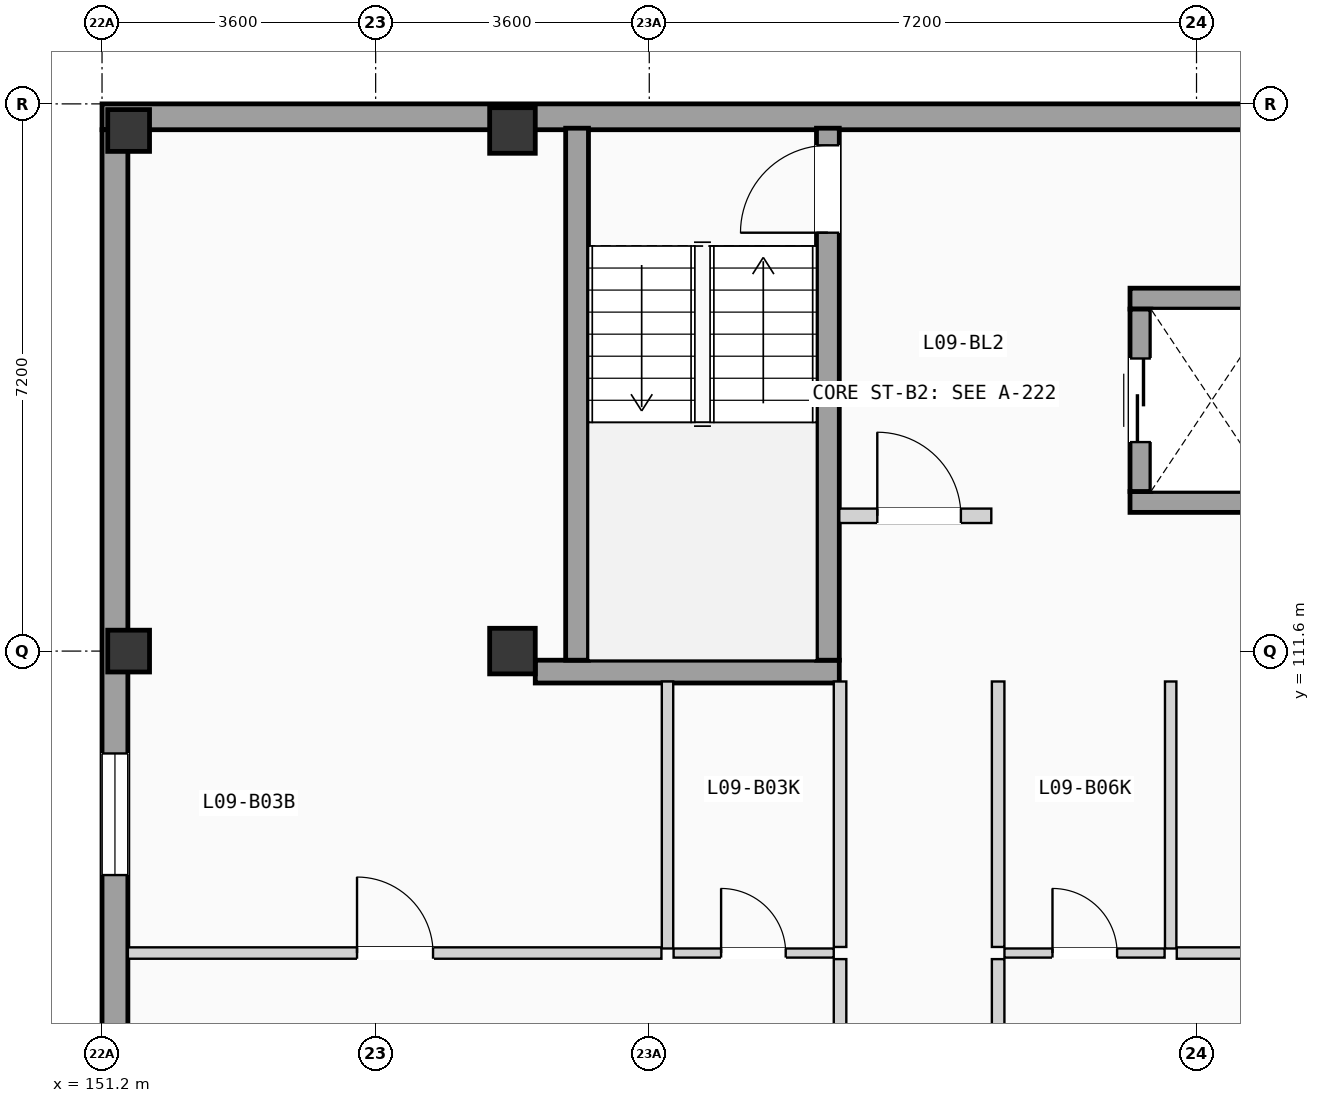
"""IFC4 building model, lengths in metres.
Left out: names, types, materials, properties, quantities, classifications, styles, units other than length and angle.
Written with IfcOpenShell. Run it as: python <this file> out.ifc"""

import sys

from ifc_helpers import new_model, si_unit, direction, frame, frame_2d, origin, origin_2d, place, context, subcontext, project, spatial, rectangle, extrude, element, fill, save


model = new_model("IFC4")
c1 = context("Model", 3, precision=1e-05, world=origin(), true_north=direction((0.0, 1.0)))
c2 = subcontext(c1, "Body", "Model", "MODEL_VIEW")
j1 = project(units=[si_unit("LENGTHUNIT", "METRE"), si_unit("PLANEANGLEUNIT", "RADIAN")], contexts=[c1])
p1 = place(None, origin())
s1 = spatial("IfcSite", under=j1, at=p1, CompositionType="ELEMENT")
p2 = place(p1, origin())
s2 = spatial("IfcBuilding", under=s1, at=p2, CompositionType="ELEMENT")
p3 = place(p2, frame((0.0, 0.0, 30.975)))
s3 = spatial("IfcBuildingStorey", under=s2, at=p3, CompositionType="ELEMENT", Elevation=30.975)
for number, where, z_axis, x_axis in (
    (1, (151.55, 111.6, 0.0), (0.0, 0.0, 1.0), (1.0, 0.0, 0.0)),
    (2, (151.55, 118.45, 0.0), (0.0, 0.0, 1.0), (1.0, 0.0, 0.0)),
):
    element("IfcColumn", number, at=place(p3, frame(where, z_axis=z_axis, x_axis=x_axis)), inside=s3, PredefinedType="COLUMN", context=c2, shape_type="SweptSolid", body=[
        extrude(rectangle(XDim=0.55, YDim=0.55, at=origin_2d()), origin(), (0.0, 0.0, 1.0), 3.15),
    ])
for number, where, z_axis, x_axis in (
    (3, (156.6, 111.6, 0.0), (0.0, 0.0, 1.0), (1.0, 0.0, 0.0)),
    (4, (156.6, 118.45, 0.0), (0.0, 0.0, 1.0), (1.0, 0.0, 0.0)),
):
    element("IfcColumn", number, at=place(p3, frame(where, z_axis=z_axis, x_axis=x_axis)), inside=s3, PredefinedType="COLUMN", context=c2, shape_type="SweptSolid", body=[
        extrude(rectangle(XDim=0.6, YDim=0.6, at=origin_2d()), origin(), (0.0, 0.0, 1.0), 3.15),
    ])
p4 = place(p3, frame((151.2, 118.63, 0.0), z_axis=(0.0, 0.0, 1.0), x_axis=(1.0, 0.0, 0.0)))
e5 = element("IfcWall", 5, at=p4, inside=s3, PredefinedType="SOLIDWALL", context=c2, shape_type="SweptSolid", body=[
    extrude(rectangle(XDim=21.6, YDim=0.34, at=frame_2d((10.8, 0.0))), origin(), (0.0, 0.0, 1.0), 2.9),
])
p5 = place(p3, frame((151.37, 68.74, 0.0), z_axis=(0.0, 0.0, 1.0), x_axis=(0.0, 1.0, 0.0)))
e6 = element("IfcWall", 6, at=p5, inside=s3, PredefinedType="SOLIDWALL", context=c2, shape_type="SweptSolid", body=[
    extrude(rectangle(XDim=49.72, YDim=0.34, at=frame_2d((24.86, 0.0))), origin(), (0.0, 0.0, 1.0), 2.9),
])
p6 = place(p5, frame((11.677, 0.0, 0.565)))
e7 = element("IfcOpeningElement", 7, at=p6, cuts=e6, PredefinedType="OPENING", context=c2, shape_type="SweptSolid", body=[
    extrude(rectangle(XDim=1.35, YDim=1.65, at=frame_2d((0.675, 0.825))), frame((0.0, 0.18, 0.0), z_axis=(0.0, -1.0, 0.0), x_axis=(1.0, 0.0, 0.0)), (0.0, 0.0, 1.0), 0.36),
])
p7 = place(p5, frame((8.532, 0.0, 0.85)))
e8 = element("IfcOpeningElement", 8, at=p7, cuts=e6, PredefinedType="OPENING", context=c2, shape_type="SweptSolid", body=[
    extrude(rectangle(XDim=0.95, YDim=1.2, at=frame_2d((0.475, 0.6))), frame((0.0, 0.18, 0.0), z_axis=(0.0, -1.0, 0.0), x_axis=(1.0, 0.0, 0.0)), (0.0, 0.0, 1.0), 0.36),
])
p8 = place(p5, frame((16.3, 0.0, 0.9)))
e9 = element("IfcOpeningElement", 9, at=p8, cuts=e6, PredefinedType="OPENING", context=c2, shape_type="SweptSolid", body=[
    extrude(rectangle(XDim=1.48, YDim=1.2, at=frame_2d((0.74, 0.6))), frame((0.0, 0.18, 0.0), z_axis=(0.0, -1.0, 0.0), x_axis=(1.0, 0.0, 0.0)), (0.0, 0.0, 1.0), 0.36),
])
p9 = place(p5, frame((24.12, 0.0, 0.865)))
e10 = element("IfcOpeningElement", 10, at=p9, cuts=e6, PredefinedType="OPENING", context=c2, shape_type="SweptSolid", body=[
    extrude(rectangle(XDim=1.48, YDim=1.35, at=frame_2d((0.74, 0.675))), frame((0.0, 0.18, 0.0), z_axis=(0.0, -1.0, 0.0), x_axis=(1.0, 0.0, 0.0)), (0.0, 0.0, 1.0), 0.36),
])
p10 = place(p5, frame((19.238, 0.0, 0.715)))
e11 = element("IfcOpeningElement", 11, at=p10, cuts=e6, PredefinedType="OPENING", context=c2, shape_type="SweptSolid", body=[
    extrude(rectangle(XDim=1.48, YDim=1.5, at=frame_2d((0.74, 0.75))), frame((0.0, 0.18, 0.0), z_axis=(0.0, -1.0, 0.0), x_axis=(1.0, 0.0, 0.0)), (0.0, 0.0, 1.0), 0.36),
])
p11 = place(p5, frame((29.002, 0.0, 0.565)))
e12 = element("IfcOpeningElement", 12, at=p11, cuts=e6, PredefinedType="OPENING", context=c2, shape_type="SweptSolid", body=[
    extrude(rectangle(XDim=1.48, YDim=1.65, at=frame_2d((0.74, 0.825))), frame((0.0, 0.18, 0.0), z_axis=(0.0, -1.0, 0.0), x_axis=(1.0, 0.0, 0.0)), (0.0, 0.0, 1.0), 0.36),
])
p12 = place(p5, frame((36.894, 0.0, 0.85)))
e13 = element("IfcOpeningElement", 13, at=p12, cuts=e6, PredefinedType="OPENING", context=c2, shape_type="SweptSolid", body=[
    extrude(rectangle(XDim=0.95, YDim=1.2, at=frame_2d((0.475, 0.6))), frame((0.0, 0.18, 0.0), z_axis=(0.0, -1.0, 0.0), x_axis=(1.0, 0.0, 0.0)), (0.0, 0.0, 1.0), 0.36),
])
p13 = place(p5, frame((31.881, 0.0, 0.9)))
e14 = element("IfcOpeningElement", 14, at=p13, cuts=e6, PredefinedType="OPENING", context=c2, shape_type="SweptSolid", body=[
    extrude(rectangle(XDim=1.6, YDim=1.2, at=frame_2d((0.8, 0.6))), frame((0.0, 0.18, 0.0), z_axis=(0.0, -1.0, 0.0), x_axis=(1.0, 0.0, 0.0)), (0.0, 0.0, 1.0), 0.36),
])
p14 = place(p5, frame((39.913, 0.0, 0.865)))
e15 = element("IfcOpeningElement", 15, at=p14, cuts=e6, PredefinedType="OPENING", context=c2, shape_type="SweptSolid", body=[
    extrude(rectangle(XDim=1.6, YDim=1.35, at=frame_2d((0.8, 0.675))), frame((0.0, 0.18, 0.0), z_axis=(0.0, -1.0, 0.0), x_axis=(1.0, 0.0, 0.0)), (0.0, 0.0, 1.0), 0.36),
])
p15 = place(p3, frame((156.9, 111.33, 0.0), z_axis=(0.0, 0.0, 1.0), x_axis=(1.0, 0.0, 0.0)))
e16 = element("IfcWall", 16, at=p15, inside=s3, PredefinedType="SHEAR", context=c2, shape_type="SweptSolid", body=[
    extrude(rectangle(XDim=4.0, YDim=0.3, at=frame_2d((2.0, 0.0))), origin(), (0.0, 0.0, 1.0), 2.9),
])
p16 = place(p3, frame((157.45, 111.48, 0.0), z_axis=(0.0, 0.0, 1.0), x_axis=(0.0, 1.0, 0.0)))
e17 = element("IfcWall", 17, at=p16, inside=s3, PredefinedType="SHEAR", context=c2, shape_type="SweptSolid", body=[
    extrude(rectangle(XDim=7.0, YDim=0.3, at=frame_2d((3.5, 0.0))), origin(), (0.0, 0.0, 1.0), 2.9),
])
p17 = place(p3, frame((160.75, 111.48, 0.0), z_axis=(0.0, 0.0, 1.0), x_axis=(0.0, 1.0, 0.0)))
e18 = element("IfcWall", 18, at=p17, inside=s3, PredefinedType="SHEAR", context=c2, shape_type="SweptSolid", body=[
    extrude(rectangle(XDim=7.0, YDim=0.3, at=frame_2d((3.5, 0.0))), origin(), (0.0, 0.0, 1.0), 2.9),
])
p18 = place(p17, frame((5.625, 0.0, 0.0)))
e19 = element("IfcOpeningElement", 19, at=p18, cuts=e18, PredefinedType="OPENING", context=c2, shape_type="SweptSolid", body=[
    extrude(rectangle(XDim=1.15, YDim=2.12, at=frame_2d((0.575, 1.06))), frame((0.0, 0.16, 0.0), z_axis=(0.0, -1.0, 0.0), x_axis=(1.0, 0.0, 0.0)), (0.0, 0.0, 1.0), 0.32),
])
for number, where, z_axis, x_axis in (
    (20, (164.725, 113.562, 0.0), (0.0, 0.0, 1.0), (1.0, 0.0, 0.0)),
    (21, (164.725, 116.238, 0.0), (0.0, 0.0, 1.0), (1.0, 0.0, 0.0)),
):
    element("IfcWall", number, at=place(p3, frame(where, z_axis=z_axis, x_axis=x_axis)), inside=s3, PredefinedType="SHEAR", context=c2, shape_type="SweptSolid", body=[
        extrude(rectangle(XDim=2.15, YDim=0.275, at=frame_2d((1.075, 0.0))), origin(), (0.0, 0.0, 1.0), 2.9),
    ])
p19 = place(p3, frame((164.863, 113.7, 0.0), z_axis=(0.0, 0.0, 1.0), x_axis=(0.0, 1.0, 0.0)))
e22 = element("IfcWall", 22, at=p19, inside=s3, PredefinedType="SHEAR", context=c2, shape_type="SweptSolid", body=[
    extrude(rectangle(XDim=2.4, YDim=0.275, at=frame_2d((1.2, 0.0))), origin(), (0.0, 0.0, 1.0), 2.9),
])
p20 = place(p19, frame((0.65, 0.0, 0.0)))
e23 = element("IfcOpeningElement", 23, at=p20, cuts=e22, PredefinedType="OPENING", context=c2, shape_type="SweptSolid", body=[
    extrude(rectangle(XDim=1.1, YDim=2.15, at=frame_2d((0.55, 1.075))), frame((0.0, 0.147, 0.0), z_axis=(0.0, -1.0, 0.0), x_axis=(1.0, 0.0, 0.0)), (0.0, 0.0, 1.0), 0.295),
])
p21 = place(p3, frame((160.9, 113.38, 0.0), z_axis=(0.0, 0.0, 1.0), x_axis=(1.0, 0.0, 0.0)))
e24 = element("IfcWall", 24, at=p21, inside=s3, PredefinedType="PARTITIONING", context=c2, shape_type="SweptSolid", body=[
    extrude(rectangle(XDim=2.0, YDim=0.19, at=frame_2d((1.0, 0.0))), origin(), (0.0, 0.0, 1.0), 2.87),
])
p22 = place(p21, frame((0.5, 0.0, 0.0)))
e25 = element("IfcOpeningElement", 25, at=p22, cuts=e24, PredefinedType="OPENING", context=c2, shape_type="SweptSolid", body=[
    extrude(rectangle(XDim=1.1, YDim=2.12, at=frame_2d((0.55, 1.06))), frame((0.0, 0.105, 0.0), z_axis=(0.0, -1.0, 0.0), x_axis=(1.0, 0.0, 0.0)), (0.0, 0.0, 1.0), 0.21),
])
p23 = place(p3, frame((160.91, 103.327, 0.0), z_axis=(0.0, 0.0, 1.0), x_axis=(0.0, 1.0, 0.0)))
e26 = element("IfcWall", 26, at=p23, inside=s3, PredefinedType="PARTITIONING", context=c2, shape_type="SweptSolid", body=[
    extrude(rectangle(XDim=4.22, YDim=0.165, at=frame_2d((2.11, 0.0))), origin(), (0.0, 0.0, 1.0), 2.87),
])
p24 = place(p23, frame((1.605, 0.0, 0.0)))
e27 = element("IfcOpeningElement", 27, at=p24, cuts=e26, PredefinedType="OPENING", context=c2, shape_type="SweptSolid", body=[
    extrude(rectangle(XDim=1.01, YDim=2.11, at=frame_2d((0.505, 1.055))), frame((0.0, 0.093, 0.0), z_axis=(0.0, -1.0, 0.0), x_axis=(1.0, 0.0, 0.0)), (0.0, 0.0, 1.0), 0.185),
])
p25 = place(p3, frame((160.91, 107.707, 0.0), z_axis=(0.0, 0.0, 1.0), x_axis=(0.0, 1.0, 0.0)))
e28 = element("IfcWall", 28, at=p25, inside=s3, PredefinedType="PARTITIONING", context=c2, shape_type="SweptSolid", body=[
    extrude(rectangle(XDim=3.493, YDim=0.165, at=frame_2d((1.747, 0.0))), origin(), (0.0, 0.0, 1.0), 2.87),
])
p26 = place(p3, frame((162.99, 103.327, 0.0), z_axis=(0.0, 0.0, 1.0), x_axis=(0.0, 1.0, 0.0)))
e29 = element("IfcWall", 29, at=p26, inside=s3, PredefinedType="PARTITIONING", context=c2, shape_type="SweptSolid", body=[
    extrude(rectangle(XDim=4.22, YDim=0.165, at=frame_2d((2.11, 0.0))), origin(), (0.0, 0.0, 1.0), 2.87),
])
p27 = place(p26, frame((1.605, 0.0, 0.0)))
e30 = element("IfcOpeningElement", 30, at=p27, cuts=e29, PredefinedType="OPENING", context=c2, shape_type="SweptSolid", body=[
    extrude(rectangle(XDim=1.01, YDim=2.11, at=frame_2d((0.505, 1.055))), frame((0.0, 0.093, 0.0), z_axis=(0.0, -1.0, 0.0), x_axis=(1.0, 0.0, 0.0)), (0.0, 0.0, 1.0), 0.185),
])
p28 = place(p3, frame((162.99, 107.707, 0.0), z_axis=(0.0, 0.0, 1.0), x_axis=(0.0, 1.0, 0.0)))
e31 = element("IfcWall", 31, at=p28, inside=s3, PredefinedType="PARTITIONING", context=c2, shape_type="SweptSolid", body=[
    extrude(rectangle(XDim=3.493, YDim=0.165, at=frame_2d((1.747, 0.0))), origin(), (0.0, 0.0, 1.0), 2.87),
])
p29 = place(p3, frame((158.72, 107.627, 0.0), z_axis=(0.0, 0.0, 1.0), x_axis=(1.0, 0.0, 0.0)))
e32 = element("IfcWall", 32, at=p29, inside=s3, PredefinedType="PARTITIONING", context=c2, shape_type="SweptSolid", body=[
    extrude(rectangle(XDim=2.107, YDim=0.12, at=frame_2d((1.053, 0.0))), origin(), (0.0, 0.0, 1.0), 2.87),
])
p30 = place(p29, frame((0.625, 0.0, 0.0)))
e33 = element("IfcOpeningElement", 33, at=p30, cuts=e32, PredefinedType="OPENING", context=c2, shape_type="SweptSolid", body=[
    extrude(rectangle(XDim=0.85, YDim=2.01, at=frame_2d((0.425, 1.005))), frame((0.0, 0.07, 0.0), z_axis=(0.0, -1.0, 0.0), x_axis=(1.0, 0.0, 0.0)), (0.0, 0.0, 1.0), 0.14),
])
p31 = place(p3, frame((151.54, 107.627, 0.0), z_axis=(0.0, 0.0, 1.0), x_axis=(1.0, 0.0, 0.0)))
e34 = element("IfcWall", 34, at=p31, inside=s3, PredefinedType="PARTITIONING", context=c2, shape_type="SweptSolid", body=[
    extrude(rectangle(XDim=7.02, YDim=0.15, at=frame_2d((3.51, 0.0))), origin(), (0.0, 0.0, 1.0), 2.87),
])
p32 = place(p31, frame((3.015, 0.0, 0.0)))
e35 = element("IfcOpeningElement", 35, at=p32, cuts=e34, PredefinedType="OPENING", context=c2, shape_type="SweptSolid", body=[
    extrude(rectangle(XDim=1.0, YDim=2.06, at=frame_2d((0.5, 1.03))), frame((0.0, 0.085, 0.0), z_axis=(0.0, -1.0, 0.0), x_axis=(1.0, 0.0, 0.0)), (0.0, 0.0, 1.0), 0.17),
])
p33 = place(p3, frame((158.64, 107.687, 0.0), z_axis=(0.0, 0.0, 1.0), x_axis=(0.0, 1.0, 0.0)))
e36 = element("IfcWall", 36, at=p33, inside=s3, PredefinedType="PARTITIONING", context=c2, shape_type="SweptSolid", body=[
    extrude(rectangle(XDim=3.513, YDim=0.15, at=frame_2d((1.756, 0.0))), origin(), (0.0, 0.0, 1.0), 2.87),
])
p34 = place(p3, frame((163.073, 107.627, 0.0), z_axis=(0.0, 0.0, 1.0), x_axis=(1.0, 0.0, 0.0)))
e37 = element("IfcWall", 37, at=p34, inside=s3, PredefinedType="PARTITIONING", context=c2, shape_type="SweptSolid", body=[
    extrude(rectangle(XDim=2.107, YDim=0.12, at=frame_2d((1.053, 0.0))), origin(), (0.0, 0.0, 1.0), 2.87),
])
p35 = place(p34, frame((0.632, 0.0, 0.0)))
e38 = element("IfcOpeningElement", 38, at=p35, cuts=e37, PredefinedType="OPENING", context=c2, shape_type="SweptSolid", body=[
    extrude(rectangle(XDim=0.85, YDim=2.01, at=frame_2d((0.425, 1.005))), frame((0.0, 0.07, 0.0), z_axis=(0.0, -1.0, 0.0), x_axis=(1.0, 0.0, 0.0)), (0.0, 0.0, 1.0), 0.14),
])
p36 = place(p3, frame((165.34, 107.627, 0.0), z_axis=(0.0, 0.0, 1.0), x_axis=(1.0, 0.0, 0.0)))
e39 = element("IfcWall", 39, at=p36, inside=s3, PredefinedType="PARTITIONING", context=c2, shape_type="SweptSolid", body=[
    extrude(rectangle(XDim=7.12, YDim=0.15, at=frame_2d((3.56, 0.0))), origin(), (0.0, 0.0, 1.0), 2.87),
])
p37 = place(p36, frame((3.085, 0.0, 0.0)))
e40 = element("IfcOpeningElement", 40, at=p37, cuts=e39, PredefinedType="OPENING", context=c2, shape_type="SweptSolid", body=[
    extrude(rectangle(XDim=0.94, YDim=2.06, at=frame_2d((0.47, 1.03))), frame((0.0, 0.085, 0.0), z_axis=(0.0, -1.0, 0.0), x_axis=(1.0, 0.0, 0.0)), (0.0, 0.0, 1.0), 0.17),
])
p38 = place(p3, frame((165.26, 107.687, 0.0), z_axis=(0.0, 0.0, 1.0), x_axis=(0.0, 1.0, 0.0)))
e41 = element("IfcWall", 41, at=p38, inside=s3, PredefinedType="PARTITIONING", context=c2, shape_type="SweptSolid", body=[
    extrude(rectangle(XDim=3.513, YDim=0.15, at=frame_2d((1.756, 0.0))), origin(), (0.0, 0.0, 1.0), 2.87),
])
p39 = place(p14, origin())
e42 = element("IfcWindow", 42, at=p39, inside=s3, PartitioningType="DOUBLE_PANEL_VERTICAL", PredefinedType="WINDOW", context=c2, shape_type="SweptSolid", body=[
    extrude(rectangle(XDim=1.6, YDim=1.35, at=frame_2d((0.8, 0.675))), frame((0.0, 0.03, 0.0), z_axis=(0.0, -1.0, 0.0), x_axis=(1.0, 0.0, 0.0)), (0.0, 0.0, 1.0), 0.06),
])
fill(e15, e42)
p40 = place(p18, origin())
e43 = element("IfcDoor", 43, at=p40, inside=s3, OperationType="SINGLE_SWING_LEFT", PredefinedType="DOOR", context=c2, shape_type="SweptSolid", body=[
    extrude(rectangle(XDim=1.15, YDim=2.12, at=frame_2d((0.575, 1.06))), frame((0.0, 0.025, 0.0), z_axis=(0.0, -1.0, 0.0), x_axis=(1.0, 0.0, 0.0)), (0.0, 0.0, 1.0), 0.05),
])
fill(e19, e43)
p41 = place(p20, origin())
e44 = element("IfcDoor", 44, at=p41, inside=s3, OperationType="SLIDING_TO_LEFT", PredefinedType="DOOR", context=c2, shape_type="SweptSolid", body=[
    extrude(rectangle(XDim=1.1, YDim=2.15, at=frame_2d((0.55, 1.075))), frame((0.0, 0.025, 0.0), z_axis=(0.0, -1.0, 0.0), x_axis=(1.0, 0.0, 0.0)), (0.0, 0.0, 1.0), 0.05),
])
fill(e23, e44)
p42 = place(p22, origin())
e45 = element("IfcDoor", 45, at=p42, inside=s3, OperationType="SINGLE_SWING_LEFT", PredefinedType="DOOR", context=c2, shape_type="SweptSolid", body=[
    extrude(rectangle(XDim=1.1, YDim=2.12, at=frame_2d((0.55, 1.06))), frame((0.0, 0.025, 0.0), z_axis=(0.0, -1.0, 0.0), x_axis=(1.0, 0.0, 0.0)), (0.0, 0.0, 1.0), 0.05),
])
fill(e25, e45)
p43 = place(p30, origin())
e46 = element("IfcDoor", 46, at=p43, inside=s3, OperationType="SINGLE_SWING_LEFT", PredefinedType="DOOR", context=c2, shape_type="SweptSolid", body=[
    extrude(rectangle(XDim=0.85, YDim=2.01, at=frame_2d((0.425, 1.005))), frame((0.0, 0.025, 0.0), z_axis=(0.0, -1.0, 0.0), x_axis=(1.0, 0.0, 0.0)), (0.0, 0.0, 1.0), 0.05),
])
fill(e33, e46)
p44 = place(p32, origin())
e47 = element("IfcDoor", 47, at=p44, inside=s3, OperationType="SINGLE_SWING_LEFT", PredefinedType="DOOR", context=c2, shape_type="SweptSolid", body=[
    extrude(rectangle(XDim=1.0, YDim=2.06, at=frame_2d((0.5, 1.03))), frame((0.0, 0.025, 0.0), z_axis=(0.0, -1.0, 0.0), x_axis=(1.0, 0.0, 0.0)), (0.0, 0.0, 1.0), 0.05),
])
fill(e35, e47)
p45 = place(p35, origin())
e48 = element("IfcDoor", 48, at=p45, inside=s3, OperationType="SINGLE_SWING_LEFT", PredefinedType="DOOR", context=c2, shape_type="SweptSolid", body=[
    extrude(rectangle(XDim=0.85, YDim=2.01, at=frame_2d((0.425, 1.005))), frame((0.0, 0.025, 0.0), z_axis=(0.0, -1.0, 0.0), x_axis=(1.0, 0.0, 0.0)), (0.0, 0.0, 1.0), 0.05),
])
fill(e38, e48)
save(model, sys.argv[1])
